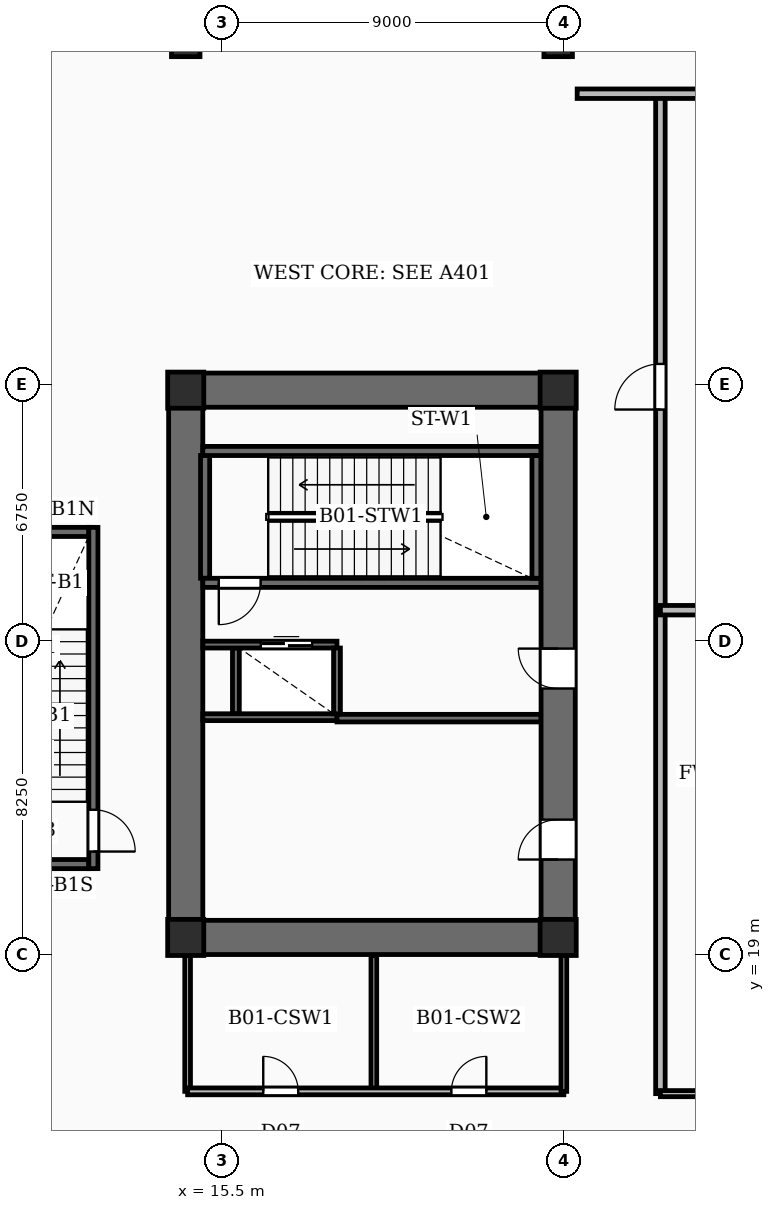
"""IFC4 building model, lengths in metres.
Left out: names, types, materials, properties, quantities, classifications, styles, units other than length and angle.
Written with IfcOpenShell. Run it as: python <this file> out.ifc"""

import sys

from ifc_helpers import new_model, si_unit, direction, frame, frame_2d, origin, origin_2d, place, context, subcontext, project, spatial, rectangle, extrude, element, fill, save


model = new_model("IFC4")
c1 = context("Model", 3, precision=1e-05, world=origin(), true_north=direction((0.0, 1.0)))
c2 = subcontext(c1, "Body", "Model", "MODEL_VIEW")
j1 = project(units=[si_unit("LENGTHUNIT", "METRE"), si_unit("PLANEANGLEUNIT", "RADIAN")], contexts=[c1])
p1 = place(None, origin())
s1 = spatial("IfcSite", under=j1, at=p1, CompositionType="ELEMENT")
p2 = place(p1, origin())
s2 = spatial("IfcBuilding", under=s1, at=p2, CompositionType="ELEMENT")
p3 = place(p2, frame((0.0, 0.0, -5.0)))
s3 = spatial("IfcBuildingStorey", under=s2, at=p3, CompositionType="ELEMENT", Elevation=-5.0)
p4 = place(p3, frame((14.55, 19.0, -0.31), z_axis=(0.0, 0.0, 1.0), x_axis=(0.0, 1.0, 0.0)))
e1 = element("IfcWall", 1, at=p4, inside=s3, PredefinedType="SHEAR", context=c2, shape_type="SweptSolid", body=[
    extrude(rectangle(XDim=15.3, YDim=0.9, at=frame_2d((7.65, 0.0))), origin(), (0.0, 0.0, 1.0), 4.86),
])
p5 = place(p3, frame((24.35, 19.0, -0.31), z_axis=(0.0, 0.0, 1.0), x_axis=(0.0, 1.0, 0.0)))
e2 = element("IfcWall", 2, at=p5, inside=s3, PredefinedType="SHEAR", context=c2, shape_type="SweptSolid", body=[
    extrude(rectangle(XDim=15.3, YDim=0.9, at=frame_2d((7.65, 0.0))), origin(), (0.0, 0.0, 1.0), 4.86),
])
p6 = place(p5, frame((2.5, 0.0, 0.31)))
e3 = element("IfcOpeningElement", 3, at=p6, cuts=e2, PredefinedType="OPENING", context=c2, shape_type="SweptSolid", body=[
    extrude(rectangle(XDim=1.05, YDim=2.15, at=frame_2d((0.525, 1.075))), frame((0.0, 0.46, 0.0), z_axis=(0.0, -1.0, 0.0), x_axis=(1.0, 0.0, 0.0)), (0.0, 0.0, 1.0), 0.92),
])
p7 = place(p5, frame((7.0, 0.0, 0.31)))
e4 = element("IfcOpeningElement", 4, at=p7, cuts=e2, PredefinedType="OPENING", context=c2, shape_type="SweptSolid", body=[
    extrude(rectangle(XDim=1.05, YDim=2.15, at=frame_2d((0.525, 1.075))), frame((0.0, 0.46, 0.0), z_axis=(0.0, -1.0, 0.0), x_axis=(1.0, 0.0, 0.0)), (0.0, 0.0, 1.0), 0.92),
])
for number, where, z_axis, x_axis in (
    (5, (15.0, 19.45, -0.31), (0.0, 0.0, 1.0), (1.0, 0.0, 0.0)),
    (6, (15.0, 33.85, -0.31), (0.0, 0.0, 1.0), (1.0, 0.0, 0.0)),
):
    element("IfcWall", number, at=place(p3, frame(where, z_axis=z_axis, x_axis=x_axis)), inside=s3, PredefinedType="SHEAR", context=c2, shape_type="SweptSolid", body=[
        extrude(rectangle(XDim=8.9, YDim=0.9, at=frame_2d((4.45, 0.0))), origin(), (0.0, 0.0, 1.0), 4.86),
    ])
for number, where, z_axis, x_axis in (
    (7, (14.55, 19.45, -0.31), (0.0, 0.0, 1.0), (1.0, 0.0, 0.0)),
    (8, (24.35, 19.45, -0.31), (0.0, 0.0, 1.0), (1.0, 0.0, 0.0)),
    (9, (14.55, 33.85, -0.31), (0.0, 0.0, 1.0), (1.0, 0.0, 0.0)),
    (10, (24.35, 33.85, -0.31), (0.0, 0.0, 1.0), (1.0, 0.0, 0.0)),
):
    element("IfcColumn", number, at=place(p3, frame(where, z_axis=z_axis, x_axis=x_axis)), inside=s3, PredefinedType="COLUMN", context=c2, shape_type="SweptSolid", body=[
        extrude(rectangle(XDim=0.95, YDim=0.95, at=origin_2d()), origin(), (0.0, 0.0, 1.0), 4.86),
    ])
for number, where, z_axis, x_axis in (
    (11, (14.55, 43.0, -0.31), (0.0, 0.0, 1.0), (1.0, 0.0, 0.0)),
    (12, (24.35, 43.0, -0.31), (0.0, 0.0, 1.0), (1.0, 0.0, 0.0)),
):
    element("IfcColumn", number, at=place(p3, frame(where, z_axis=z_axis, x_axis=x_axis)), inside=s3, PredefinedType="COLUMN", context=c2, shape_type="SweptSolid", body=[
        extrude(rectangle(XDim=0.75, YDim=0.75, at=origin_2d()), origin(), (0.0, 0.0, 1.0), 4.86),
    ])
p8 = place(p3, frame((12.12, 30.24, 0.0), z_axis=(0.0, 0.0, 1.0), x_axis=(0.0, -1.0, 0.0)))
e13 = element("IfcWall", 13, at=p8, inside=s3, PredefinedType="SOLIDWALL", context=c2, shape_type="SweptSolid", body=[
    extrude(rectangle(XDim=8.98, YDim=0.24, at=frame_2d((4.49, 0.0))), origin(), (0.0, 0.0, 1.0), 4.55),
])
p9 = place(p8, frame((7.43, 0.0, 0.0)))
e14 = element("IfcOpeningElement", 14, at=p9, cuts=e13, PredefinedType="OPENING", context=c2, shape_type="SweptSolid", body=[
    extrude(rectangle(XDim=1.1, YDim=2.15, at=frame_2d((0.55, 1.075))), frame((0.0, 0.13, 0.0), z_axis=(0.0, -1.0, 0.0), x_axis=(1.0, 0.0, 0.0)), (0.0, 0.0, 1.0), 0.26),
])
for number, where, z_axis, x_axis in (
    (15, (8.81, 21.38, 0.0), (0.0, 0.0, 1.0), (1.0, 0.0, 0.0)),
    (16, (8.81, 30.12, 0.0), (0.0, 0.0, 1.0), (1.0, 0.0, 0.0)),
):
    element("IfcWall", number, at=place(p3, frame(where, z_axis=z_axis, x_axis=x_axis)), inside=s3, PredefinedType="SOLIDWALL", context=c2, shape_type="SweptSolid", body=[
        extrude(rectangle(XDim=3.19, YDim=0.24, at=frame_2d((1.595, 0.0))), origin(), (0.0, 0.0, 1.0), 4.55),
    ])
p10 = place(p3, frame((23.9, 28.78, 0.0), z_axis=(0.0, 0.0, 1.0), x_axis=(-1.0, 0.0, 0.0)))
e17 = element("IfcWall", 17, at=p10, inside=s3, PredefinedType="SOLIDWALL", context=c2, shape_type="SweptSolid", body=[
    extrude(rectangle(XDim=8.9, YDim=0.24, at=frame_2d((4.45, 0.0))), origin(), (0.0, 0.0, 1.0), 4.55),
])
p11 = place(p10, frame((7.38, 0.0, 0.0)))
e18 = element("IfcOpeningElement", 18, at=p11, cuts=e17, PredefinedType="OPENING", context=c2, shape_type="SweptSolid", body=[
    extrude(rectangle(XDim=1.1, YDim=2.15, at=frame_2d((0.55, 1.075))), frame((0.0, 0.13, 0.0), z_axis=(0.0, -1.0, 0.0), x_axis=(1.0, 0.0, 0.0)), (0.0, 0.0, 1.0), 0.26),
])
p12 = place(p3, frame((15.0, 32.25, 0.0), z_axis=(0.0, 0.0, 1.0), x_axis=(1.0, 0.0, 0.0)))
e19 = element("IfcWall", 19, at=p12, inside=s3, PredefinedType="SOLIDWALL", context=c2, shape_type="SweptSolid", body=[
    extrude(rectangle(XDim=8.9, YDim=0.24, at=frame_2d((4.45, 0.0))), origin(), (0.0, 0.0, 1.0), 4.55),
])
for number, where, z_axis, x_axis in (
    (20, (15.06, 28.9, 0.0), (0.0, 0.0, 1.0), (0.0, 1.0, 0.0)),
    (21, (23.78, 28.9, 0.0), (0.0, 0.0, 1.0), (0.0, 1.0, 0.0)),
):
    element("IfcWall", number, at=place(p3, frame(where, z_axis=z_axis, x_axis=x_axis)), inside=s3, PredefinedType="SOLIDWALL", context=c2, shape_type="SweptSolid", body=[
        extrude(rectangle(XDim=3.23, YDim=0.24, at=frame_2d((1.615, 0.0))), origin(), (0.0, 0.0, 1.0), 4.55),
    ])
p13 = place(p3, frame((15.0, 27.155, 0.0), z_axis=(0.0, 0.0, 1.0), x_axis=(1.0, 0.0, 0.0)))
e22 = element("IfcWall", 22, at=p13, inside=s3, PredefinedType="SOLIDWALL", context=c2, shape_type="SweptSolid", body=[
    extrude(rectangle(XDim=3.53, YDim=0.18, at=frame_2d((1.765, 0.0))), origin(), (0.0, 0.0, 1.0), 4.55),
])
p14 = place(p13, frame((1.525, 0.0, 0.0)))
e23 = element("IfcOpeningElement", 23, at=p14, cuts=e22, PredefinedType="OPENING", context=c2, shape_type="SweptSolid", body=[
    extrude(rectangle(XDim=1.35, YDim=2.3, at=frame_2d((0.675, 1.15))), frame((0.0, 0.1, 0.0), z_axis=(0.0, -1.0, 0.0), x_axis=(1.0, 0.0, 0.0)), (0.0, 0.0, 1.0), 0.2),
])
p15 = place(p3, frame((15.0, 25.245, 0.0), z_axis=(0.0, 0.0, 1.0), x_axis=(1.0, 0.0, 0.0)))
e24 = element("IfcWall", 24, at=p15, inside=s3, PredefinedType="SOLIDWALL", context=c2, shape_type="SweptSolid", body=[
    extrude(rectangle(XDim=3.53, YDim=0.18, at=frame_2d((1.765, 0.0))), origin(), (0.0, 0.0, 1.0), 4.55),
])
for number, where, z_axis, x_axis in (
    (25, (15.87, 25.335, 0.0), (0.0, 0.0, 1.0), (0.0, 1.0, 0.0)),
    (26, (18.53, 25.335, 0.0), (0.0, 0.0, 1.0), (0.0, 1.0, 0.0)),
):
    element("IfcWall", number, at=place(p3, frame(where, z_axis=z_axis, x_axis=x_axis)), inside=s3, PredefinedType="SOLIDWALL", context=c2, shape_type="SweptSolid", body=[
        extrude(rectangle(XDim=1.73, YDim=0.18, at=frame_2d((0.865, 0.0))), origin(), (0.0, 0.0, 1.0), 4.55),
    ])
p16 = place(p3, frame((18.53, 25.22, 0.0), z_axis=(0.0, 0.0, 1.0), x_axis=(1.0, 0.0, 0.0)))
e27 = element("IfcWall", 27, at=p16, inside=s3, PredefinedType="SOLIDWALL", context=c2, shape_type="SweptSolid", body=[
    extrude(rectangle(XDim=5.37, YDim=0.2, at=frame_2d((2.685, 0.0))), origin(), (0.0, 0.0, 1.0), 3.61),
])
p17 = place(p3, frame((19.5, 15.4, 0.0), z_axis=(0.0, 0.0, 1.0), x_axis=(0.0, 1.0, 0.0)))
e28 = element("IfcWall", 28, at=p17, inside=s3, PredefinedType="PARTITIONING", context=c2, shape_type="SweptSolid", body=[
    extrude(rectangle(XDim=3.58, YDim=0.15, at=frame_2d((1.79, 0.0))), origin(), (0.0, 0.0, 1.0), 3.61),
])
p18 = place(p3, frame((14.6, 15.4, 0.0), z_axis=(0.0, 0.0, 1.0), x_axis=(1.0, 0.0, 0.0)))
e29 = element("IfcWall", 29, at=p18, inside=s3, PredefinedType="PARTITIONING", context=c2, shape_type="SweptSolid", body=[
    extrude(rectangle(XDim=9.9, YDim=0.18, at=frame_2d((4.95, 0.0))), origin(), (0.0, 0.0, 1.0), 3.61),
])
p19 = place(p18, frame((1.99, 0.0, 0.0)))
e30 = element("IfcOpeningElement", 30, at=p19, cuts=e29, PredefinedType="OPENING", context=c2, shape_type="SweptSolid", body=[
    extrude(rectangle(XDim=0.92, YDim=2.1, at=frame_2d((0.46, 1.05))), frame((0.0, 0.1, 0.0), z_axis=(0.0, -1.0, 0.0), x_axis=(1.0, 0.0, 0.0)), (0.0, 0.0, 1.0), 0.2),
])
p20 = place(p18, frame((6.94, 0.0, 0.0)))
e31 = element("IfcOpeningElement", 31, at=p20, cuts=e29, PredefinedType="OPENING", context=c2, shape_type="SweptSolid", body=[
    extrude(rectangle(XDim=0.92, YDim=2.1, at=frame_2d((0.46, 1.05))), frame((0.0, 0.1, 0.0), z_axis=(0.0, -1.0, 0.0), x_axis=(1.0, 0.0, 0.0)), (0.0, 0.0, 1.0), 0.2),
])
for number, where, z_axis, x_axis in (
    (32, (14.6, 15.4, 0.0), (0.0, 0.0, 1.0), (0.0, 1.0, 0.0)),
    (33, (24.5, 15.4, 0.0), (0.0, 0.0, 1.0), (0.0, 1.0, 0.0)),
):
    element("IfcWall", number, at=place(p3, frame(where, z_axis=z_axis, x_axis=x_axis)), inside=s3, PredefinedType="PARTITIONING", context=c2, shape_type="SweptSolid", body=[
        extrude(rectangle(XDim=3.58, YDim=0.15, at=frame_2d((1.79, 0.0))), origin(), (0.0, 0.0, 1.0), 3.61),
    ])
p21 = place(p3, frame((27.04, 15.34, 0.0), z_axis=(0.0, 0.0, 1.0), x_axis=(1.0, 0.0, 0.0)))
e34 = element("IfcWall", 34, at=p21, inside=s3, PredefinedType="PARTITIONING", context=c2, shape_type="SweptSolid", body=[
    extrude(rectangle(XDim=20.92, YDim=0.16, at=frame_2d((10.46, 0.0))), origin(), (0.0, 0.0, 1.0), 3.61),
])
p22 = place(p21, frame((4.2, 0.0, 0.0)))
e35 = element("IfcOpeningElement", 35, at=p22, cuts=e34, PredefinedType="OPENING", context=c2, shape_type="SweptSolid", body=[
    extrude(rectangle(XDim=1.2, YDim=2.2, at=frame_2d((0.6, 1.1))), frame((0.0, 0.09, 0.0), z_axis=(0.0, -1.0, 0.0), x_axis=(1.0, 0.0, 0.0)), (0.0, 0.0, 1.0), 0.18),
])
p23 = place(p21, frame((14.5, 0.0, 0.0)))
e36 = element("IfcOpeningElement", 36, at=p23, cuts=e34, PredefinedType="OPENING", context=c2, shape_type="SweptSolid", body=[
    extrude(rectangle(XDim=1.2, YDim=2.2, at=frame_2d((0.6, 1.1))), frame((0.0, 0.09, 0.0), z_axis=(0.0, -1.0, 0.0), x_axis=(1.0, 0.0, 0.0)), (0.0, 0.0, 1.0), 0.18),
])
p24 = place(p3, frame((27.04, 28.06, 0.0), z_axis=(0.0, 0.0, 1.0), x_axis=(1.0, 0.0, 0.0)))
e37 = element("IfcWall", 37, at=p24, inside=s3, PredefinedType="SOLIDWALL", context=c2, shape_type="SweptSolid", body=[
    extrude(rectangle(XDim=20.92, YDim=0.25, at=frame_2d((10.46, 0.0))), origin(), (0.0, 0.0, 1.0), 3.61),
])
p25 = place(p3, frame((24.85, 41.65, 0.0), z_axis=(0.0, 0.0, 1.0), x_axis=(1.0, 0.0, 0.0)))
e38 = element("IfcWall", 38, at=p25, inside=s3, PredefinedType="SOLIDWALL", context=c2, shape_type="SweptSolid", body=[
    extrude(rectangle(XDim=25.2, YDim=0.25, at=frame_2d((12.6, 0.0))), origin(), (0.0, 0.0, 1.0), 3.61),
])
p26 = place(p3, frame((27.04, 15.34, 0.0), z_axis=(0.0, 0.0, 1.0), x_axis=(0.0, 1.0, 0.0)))
e39 = element("IfcWall", 39, at=p26, inside=s3, PredefinedType="SOLIDWALL", context=c2, shape_type="SweptSolid", body=[
    extrude(rectangle(XDim=26.31, YDim=0.25, at=frame_2d((13.155, 0.0))), origin(), (0.0, 0.0, 1.0), 3.61),
])
p27 = place(p26, frame((18.0, 0.0, 0.0)))
e40 = element("IfcOpeningElement", 40, at=p27, cuts=e39, PredefinedType="OPENING", context=c2, shape_type="SweptSolid", body=[
    extrude(rectangle(XDim=1.2, YDim=2.2, at=frame_2d((0.6, 1.1))), frame((0.0, 0.135, 0.0), z_axis=(0.0, -1.0, 0.0), x_axis=(1.0, 0.0, 0.0)), (0.0, 0.0, 1.0), 0.27),
])
p28 = place(p9, origin())
e41 = element("IfcDoor", 41, at=p28, inside=s3, OperationType="SINGLE_SWING_RIGHT", PredefinedType="DOOR", context=c2, shape_type="SweptSolid", body=[
    extrude(rectangle(XDim=1.1, YDim=2.15, at=frame_2d((0.55, 1.075))), frame((0.0, 0.025, 0.0), z_axis=(0.0, -1.0, 0.0), x_axis=(1.0, 0.0, 0.0)), (0.0, 0.0, 1.0), 0.05),
])
fill(e14, e41)
p29 = place(p6, origin())
e42 = element("IfcDoor", 42, at=p29, inside=s3, OperationType="SINGLE_SWING_LEFT", PredefinedType="DOOR", context=c2, shape_type="SweptSolid", body=[
    extrude(rectangle(XDim=1.05, YDim=2.15, at=frame_2d((0.525, 1.075))), frame((0.0, 0.025, 0.0), z_axis=(0.0, -1.0, 0.0), x_axis=(1.0, 0.0, 0.0)), (0.0, 0.0, 1.0), 0.05),
])
fill(e3, e42)
p30 = place(p7, origin())
e43 = element("IfcDoor", 43, at=p30, inside=s3, OperationType="SINGLE_SWING_RIGHT", PredefinedType="DOOR", context=c2, shape_type="SweptSolid", body=[
    extrude(rectangle(XDim=1.05, YDim=2.15, at=frame_2d((0.525, 1.075))), frame((0.0, 0.025, 0.0), z_axis=(0.0, -1.0, 0.0), x_axis=(1.0, 0.0, 0.0)), (0.0, 0.0, 1.0), 0.05),
])
fill(e4, e43)
p31 = place(p11, origin())
e44 = element("IfcDoor", 44, at=p31, inside=s3, OperationType="SINGLE_SWING_RIGHT", PredefinedType="DOOR", context=c2, shape_type="SweptSolid", body=[
    extrude(rectangle(XDim=1.1, YDim=2.15, at=frame_2d((0.55, 1.075))), frame((0.0, 0.025, 0.0), z_axis=(0.0, -1.0, 0.0), x_axis=(1.0, 0.0, 0.0)), (0.0, 0.0, 1.0), 0.05),
])
fill(e18, e44)
p32 = place(p14, origin())
e45 = element("IfcDoor", 45, at=p32, inside=s3, OperationType="DOUBLE_DOOR_SLIDING", PredefinedType="DOOR", context=c2, shape_type="SweptSolid", body=[
    extrude(rectangle(XDim=1.35, YDim=2.3, at=frame_2d((0.675, 1.15))), frame((0.0, 0.025, 0.0), z_axis=(0.0, -1.0, 0.0), x_axis=(1.0, 0.0, 0.0)), (0.0, 0.0, 1.0), 0.05),
])
fill(e23, e45)
p33 = place(p19, origin())
e46 = element("IfcDoor", 46, at=p33, inside=s3, OperationType="SINGLE_SWING_LEFT", PredefinedType="DOOR", context=c2, shape_type="SweptSolid", body=[
    extrude(rectangle(XDim=0.92, YDim=2.1, at=frame_2d((0.46, 1.05))), frame((0.0, 0.025, 0.0), z_axis=(0.0, -1.0, 0.0), x_axis=(1.0, 0.0, 0.0)), (0.0, 0.0, 1.0), 0.05),
])
fill(e30, e46)
p34 = place(p20, origin())
e47 = element("IfcDoor", 47, at=p34, inside=s3, OperationType="SINGLE_SWING_RIGHT", PredefinedType="DOOR", context=c2, shape_type="SweptSolid", body=[
    extrude(rectangle(XDim=0.92, YDim=2.1, at=frame_2d((0.46, 1.05))), frame((0.0, 0.025, 0.0), z_axis=(0.0, -1.0, 0.0), x_axis=(1.0, 0.0, 0.0)), (0.0, 0.0, 1.0), 0.05),
])
fill(e31, e47)
p35 = place(p27, origin())
e48 = element("IfcDoor", 48, at=p35, inside=s3, OperationType="SINGLE_SWING_LEFT", PredefinedType="DOOR", context=c2, shape_type="SweptSolid", body=[
    extrude(rectangle(XDim=1.2, YDim=2.2, at=frame_2d((0.6, 1.1))), frame((0.0, 0.025, 0.0), z_axis=(0.0, -1.0, 0.0), x_axis=(1.0, 0.0, 0.0)), (0.0, 0.0, 1.0), 0.05),
])
fill(e40, e48)
save(model, sys.argv[1])
